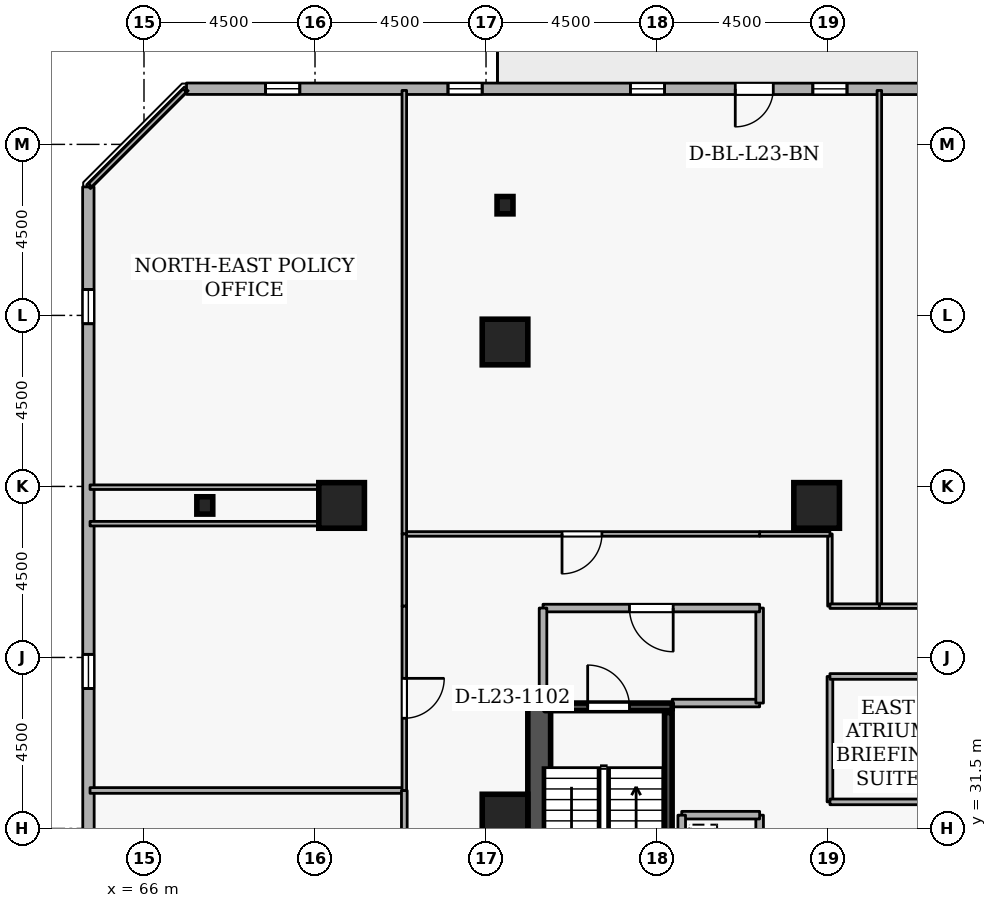
"""IFC4 building model, lengths in metres.
Left out: names, types, materials, properties, quantities, classifications, styles, units other than length and angle.
Written with IfcOpenShell. Run it as: python <this file> out.ifc"""

import sys

from ifc_helpers import new_model, si_unit, direction, frame, frame_2d, origin, origin_2d, place, context, subcontext, project, spatial, rectangle, i_section, extrude, element, fill, save


model = new_model("IFC4")
c1 = context("Model", 3, precision=1e-05, world=origin(), true_north=direction((0.0, 1.0)))
c2 = subcontext(c1, "Body", "Model", "MODEL_VIEW")
j1 = project(units=[si_unit("LENGTHUNIT", "METRE"), si_unit("PLANEANGLEUNIT", "RADIAN")], contexts=[c1])
p1 = place(None, origin())
s1 = spatial("IfcSite", under=j1, at=p1, CompositionType="ELEMENT")
p2 = place(p1, origin())
s2 = spatial("IfcBuilding", under=s1, at=p2, CompositionType="ELEMENT")
p3 = place(p2, frame((0.0, 0.0, 90.9)))
s3 = spatial("IfcBuildingStorey", under=s2, at=p3, CompositionType="ELEMENT", Elevation=90.9)
p4 = place(p3, frame((76.4, 19.2, 0.0), z_axis=(0.0, 0.0, 1.0), x_axis=(0.0, 1.0, 0.0)))
e1 = element("IfcWall", 1, at=p4, inside=s3, PredefinedType="SHEAR", context=c2, shape_type="SweptSolid", body=[
    extrude(rectangle(XDim=15.6, YDim=0.6, at=frame_2d((7.8, 0.0))), origin(), (0.0, 0.0, 1.0), 3.6),
])
for number, where, z_axis, x_axis in (
    (2, (75.5, 44.3, 0.0), (0.0, 0.0, 1.0), (1.0, 0.0, 0.0)),
    (3, (71.2, 40.0, 0.0), (0.0, 0.0, 1.0), (1.0, 0.0, 0.0)),
    (4, (83.7, 40.0, 0.0), (0.0, 0.0, 1.0), (1.0, 0.0, 0.0)),
    (5, (75.5, 31.8, 0.0), (0.0, 0.0, 1.0), (1.0, 0.0, 0.0)),
):
    element("IfcColumn", number, at=place(p3, frame(where, z_axis=z_axis, x_axis=x_axis)), inside=s3, PredefinedType="COLUMN", context=c2, shape_type="SweptSolid", body=[
        extrude(rectangle(XDim=1.2, YDim=1.2, at=origin_2d()), origin(), (0.0, 0.0, 1.0), 3.6),
    ])
for number, where, z_axis, x_axis in (
    (6, (75.5, 47.9, 0.0), (0.0, 0.0, 1.0), (1.0, 0.0, 0.0)),
    (7, (67.6, 40.0, 0.0), (0.0, 0.0, 1.0), (1.0, 0.0, 0.0)),
):
    element("IfcColumn", number, at=place(p3, frame(where, z_axis=z_axis, x_axis=x_axis)), inside=s3, PredefinedType="COLUMN", context=c2, shape_type="SweptSolid", body=[
        extrude(i_section(OverallWidth=0.418, OverallDepth=0.456, WebThickness=0.042, FlangeThickness=0.067, FilletRadius=0.015, at=origin_2d()), origin(), (0.0, 0.0, 1.0), 3.6),
    ])
p5 = place(p3, frame((101.599, 50.957, 0.0), z_axis=(0.0, 0.0, 1.0), x_axis=(-0.99999997744, 0.000212414941, 0.0)))
e8 = element("IfcWall", 8, at=p5, inside=s3, PredefinedType="STANDARD", context=c2, shape_type="SweptSolid", body=[
    extrude(rectangle(XDim=34.481, YDim=0.3, at=frame_2d((17.24, 0.0))), origin(), (0.0, 0.0, 1.0), 2.7),
])
p6 = place(p5, frame((19.04, 0.0, 0.0)))
e9 = element("IfcOpeningElement", 9, at=p6, cuts=e8, PredefinedType="OPENING", context=c2, shape_type="SweptSolid", body=[
    extrude(rectangle(XDim=1.0, YDim=2.08, at=frame_2d((0.5, 1.04))), frame((0.0, 0.16, 0.0), z_axis=(0.0, -1.0, 0.0), x_axis=(1.0, 0.0, 0.0)), (0.0, 0.0, 1.0), 0.32),
])
p7 = place(p5, frame((2.7, 0.0, 0.72)))
e10 = element("IfcOpeningElement", 10, at=p7, cuts=e8, PredefinedType="OPENING", context=c2, shape_type="SweptSolid", body=[
    extrude(rectangle(XDim=0.9, YDim=1.75, at=frame_2d((0.45, 0.875))), frame((0.0, 0.16, 0.0), z_axis=(0.0, -1.0, 0.0), x_axis=(1.0, 0.0, 0.0)), (0.0, 0.0, 1.0), 0.32),
])
p8 = place(p5, frame((7.5, 0.0, 0.72)))
e11 = element("IfcOpeningElement", 11, at=p8, cuts=e8, PredefinedType="OPENING", context=c2, shape_type="SweptSolid", body=[
    extrude(rectangle(XDim=0.9, YDim=1.75, at=frame_2d((0.45, 0.875))), frame((0.0, 0.16, 0.0), z_axis=(0.0, -1.0, 0.0), x_axis=(1.0, 0.0, 0.0)), (0.0, 0.0, 1.0), 0.32),
])
p9 = place(p5, frame((17.1, 0.0, 0.72)))
e12 = element("IfcOpeningElement", 12, at=p9, cuts=e8, PredefinedType="OPENING", context=c2, shape_type="SweptSolid", body=[
    extrude(rectangle(XDim=0.9, YDim=1.75, at=frame_2d((0.45, 0.875))), frame((0.0, 0.16, 0.0), z_axis=(0.0, -1.0, 0.0), x_axis=(1.0, 0.0, 0.0)), (0.0, 0.0, 1.0), 0.32),
])
p10 = place(p5, frame((21.9, 0.0, 0.72)))
e13 = element("IfcOpeningElement", 13, at=p10, cuts=e8, PredefinedType="OPENING", context=c2, shape_type="SweptSolid", body=[
    extrude(rectangle(XDim=0.9, YDim=1.75, at=frame_2d((0.45, 0.875))), frame((0.0, 0.16, 0.0), z_axis=(0.0, -1.0, 0.0), x_axis=(1.0, 0.0, 0.0)), (0.0, 0.0, 1.0), 0.32),
])
p11 = place(p5, frame((26.7, 0.0, 0.72)))
e14 = element("IfcOpeningElement", 14, at=p11, cuts=e8, PredefinedType="OPENING", context=c2, shape_type="SweptSolid", body=[
    extrude(rectangle(XDim=0.9, YDim=1.75, at=frame_2d((0.45, 0.875))), frame((0.0, 0.16, 0.0), z_axis=(0.0, -1.0, 0.0), x_axis=(1.0, 0.0, 0.0)), (0.0, 0.0, 1.0), 0.32),
])
p12 = place(p5, frame((31.5, 0.0, 0.72)))
e15 = element("IfcOpeningElement", 15, at=p12, cuts=e8, PredefinedType="OPENING", context=c2, shape_type="SweptSolid", body=[
    extrude(rectangle(XDim=0.9, YDim=1.75, at=frame_2d((0.45, 0.875))), frame((0.0, 0.16, 0.0), z_axis=(0.0, -1.0, 0.0), x_axis=(1.0, 0.0, 0.0)), (0.0, 0.0, 1.0), 0.32),
])
p13 = place(p3, frame((64.535, 48.381, 0.0), z_axis=(0.0, 0.0, 1.0), x_axis=(0.000212414941, -0.99999997744, 0.0)))
e16 = element("IfcWall", 16, at=p13, inside=s3, PredefinedType="STANDARD", context=c2, shape_type="SweptSolid", body=[
    extrude(rectangle(XDim=34.481, YDim=0.3, at=frame_2d((17.24, 0.0))), origin(), (0.0, 0.0, 1.0), 2.7),
])
p14 = place(p13, frame((2.7, 0.0, 0.72)))
e17 = element("IfcOpeningElement", 17, at=p14, cuts=e16, PredefinedType="OPENING", context=c2, shape_type="SweptSolid", body=[
    extrude(rectangle(XDim=0.9, YDim=1.75, at=frame_2d((0.45, 0.875))), frame((0.0, 0.16, 0.0), z_axis=(0.0, -1.0, 0.0), x_axis=(1.0, 0.0, 0.0)), (0.0, 0.0, 1.0), 0.32),
])
p15 = place(p13, frame((12.3, 0.0, 0.72)))
e18 = element("IfcOpeningElement", 18, at=p15, cuts=e16, PredefinedType="OPENING", context=c2, shape_type="SweptSolid", body=[
    extrude(rectangle(XDim=0.9, YDim=1.75, at=frame_2d((0.45, 0.875))), frame((0.0, 0.16, 0.0), z_axis=(0.0, -1.0, 0.0), x_axis=(1.0, 0.0, 0.0)), (0.0, 0.0, 1.0), 0.32),
])
p16 = place(p13, frame((17.1, 0.0, 0.72)))
e19 = element("IfcOpeningElement", 19, at=p16, cuts=e16, PredefinedType="OPENING", context=c2, shape_type="SweptSolid", body=[
    extrude(rectangle(XDim=0.9, YDim=1.75, at=frame_2d((0.45, 0.875))), frame((0.0, 0.16, 0.0), z_axis=(0.0, -1.0, 0.0), x_axis=(1.0, 0.0, 0.0)), (0.0, 0.0, 1.0), 0.32),
])
p17 = place(p13, frame((31.5, 0.0, 0.72)))
e20 = element("IfcOpeningElement", 20, at=p17, cuts=e16, PredefinedType="OPENING", context=c2, shape_type="SweptSolid", body=[
    extrude(rectangle(XDim=0.9, YDim=1.75, at=frame_2d((0.45, 0.875))), frame((0.0, 0.16, 0.0), z_axis=(0.0, -1.0, 0.0), x_axis=(1.0, 0.0, 0.0)), (0.0, 0.0, 1.0), 0.32),
])
p18 = place(p3, frame((76.55, 34.7, 0.0), z_axis=(0.0, 0.0, 1.0), x_axis=(1.0, 0.0, 0.0)))
e21 = element("IfcWall", 21, at=p18, inside=s3, PredefinedType="SHEAR", context=c2, shape_type="SweptSolid", body=[
    extrude(rectangle(XDim=3.35, YDim=0.2, at=frame_2d((1.675, 0.0))), origin(), (0.0, 0.0, 1.0), 3.6),
])
p19 = place(p18, frame((1.125, 0.0, 0.0)))
e22 = element("IfcOpeningElement", 22, at=p19, cuts=e21, PredefinedType="OPENING", context=c2, shape_type="SweptSolid", body=[
    extrude(rectangle(XDim=1.1, YDim=2.1, at=frame_2d((0.55, 1.05))), frame((0.0, 0.11, 0.0), z_axis=(0.0, -1.0, 0.0), x_axis=(1.0, 0.0, 0.0)), (0.0, 0.0, 1.0), 0.22),
])
p20 = place(p3, frame((79.797, 27.45, 0.0), z_axis=(0.0, 0.0, 1.0), x_axis=(0.0, 1.0, 0.0)))
e23 = element("IfcWall", 23, at=p20, inside=s3, PredefinedType="SHEAR", context=c2, shape_type="SweptSolid", body=[
    extrude(rectangle(XDim=7.1, YDim=0.2, at=frame_2d((3.55, 0.0))), origin(), (0.0, 0.0, 1.0), 3.6),
])
p21 = place(p3, frame((79.9, 34.8, 0.0), z_axis=(0.0, 0.0, 1.0), x_axis=(1.0, 0.0, 0.0)))
e24 = element("IfcWall", 24, at=p21, inside=s3, PredefinedType="STANDARD", context=c2, shape_type="SweptSolid", body=[
    extrude(rectangle(XDim=2.3, YDim=0.2, at=frame_2d((1.15, 0.0))), origin(), (0.0, 0.0, 1.0), 2.545),
])
p22 = place(p3, frame((82.2, 34.8, 0.0), z_axis=(0.0, 0.0, 1.0), x_axis=(0.0, 1.0, 0.0)))
e25 = element("IfcWall", 25, at=p22, inside=s3, PredefinedType="STANDARD", context=c2, shape_type="SweptSolid", body=[
    extrude(rectangle(XDim=2.5, YDim=0.2, at=frame_2d((1.25, 0.0))), origin(), (0.0, 0.0, 1.0), 3.34),
])
p23 = place(p3, frame((82.2, 37.3, 0.0), z_axis=(0.0, 0.0, 1.0), x_axis=(-1.0, 0.0, 0.0)))
e26 = element("IfcWall", 26, at=p23, inside=s3, PredefinedType="STANDARD", context=c2, shape_type="SweptSolid", body=[
    extrude(rectangle(XDim=5.7, YDim=0.2, at=frame_2d((2.85, 0.0))), origin(), (0.0, 0.0, 1.0), 3.34),
])
p24 = place(p23, frame((2.275, 0.0, 0.0)))
e27 = element("IfcOpeningElement", 27, at=p24, cuts=e26, PredefinedType="OPENING", context=c2, shape_type="SweptSolid", body=[
    extrude(rectangle(XDim=1.15, YDim=2.1, at=frame_2d((0.575, 1.05))), frame((0.0, 0.11, 0.0), z_axis=(0.0, -1.0, 0.0), x_axis=(1.0, 0.0, 0.0)), (0.0, 0.0, 1.0), 0.22),
])
p25 = place(p3, frame((76.5, 37.3, 0.0), z_axis=(0.0, 0.0, 1.0), x_axis=(0.0, -1.0, 0.0)))
e28 = element("IfcWall", 28, at=p25, inside=s3, PredefinedType="STANDARD", context=c2, shape_type="SweptSolid", body=[
    extrude(rectangle(XDim=2.5, YDim=0.2, at=frame_2d((1.25, 0.0))), origin(), (0.0, 0.0, 1.0), 3.34),
])
p26 = place(p3, frame((82.2, 30.05, 0.0), z_axis=(0.0, 0.0, 1.0), x_axis=(0.0, 1.0, 0.0)))
e29 = element("IfcWall", 29, at=p26, inside=s3, PredefinedType="STANDARD", context=c2, shape_type="SweptSolid", body=[
    extrude(rectangle(XDim=1.8, YDim=0.2, at=frame_2d((0.9, 0.0))), origin(), (0.0, 0.0, 1.0), 3.34),
])
p27 = place(p26, frame((0.46, 0.0, 0.0)))
e30 = element("IfcOpeningElement", 30, at=p27, cuts=e29, PredefinedType="OPENING", context=c2, shape_type="SweptSolid", body=[
    extrude(rectangle(XDim=0.88, YDim=2.04, at=frame_2d((0.44, 1.02))), frame((0.0, 0.11, 0.0), z_axis=(0.0, -1.0, 0.0), x_axis=(1.0, 0.0, 0.0)), (0.0, 0.0, 1.0), 0.22),
])
p28 = place(p3, frame((82.2, 31.85, 0.0), z_axis=(0.0, 0.0, 1.0), x_axis=(-1.0, 0.0, 0.0)))
e31 = element("IfcWall", 31, at=p28, inside=s3, PredefinedType="STANDARD", context=c2, shape_type="SweptSolid", body=[
    extrude(rectangle(XDim=2.05, YDim=0.2, at=frame_2d((1.025, 0.0))), origin(), (0.0, 0.0, 1.0), 3.34),
])
p29 = place(p3, frame((80.15, 31.85, 0.0), z_axis=(0.0, 0.0, 1.0), x_axis=(0.0, -1.0, 0.0)))
e32 = element("IfcWall", 32, at=p29, inside=s3, PredefinedType="STANDARD", context=c2, shape_type="SweptSolid", body=[
    extrude(rectangle(XDim=1.8, YDim=0.2, at=frame_2d((0.9, 0.0))), origin(), (0.0, 0.0, 1.0), 3.34),
])
p30 = place(p3, frame((85.35, 37.35, 0.0), z_axis=(0.0, 0.0, 1.0), x_axis=(0.0, 1.0, 0.0)))
e33 = element("IfcWall", 33, at=p30, inside=s3, PredefinedType="PARTITIONING", context=c2, shape_type="SweptSolid", body=[
    extrude(rectangle(XDim=13.57, YDim=0.12, at=frame_2d((6.785, 0.0))), origin(), (0.0, 0.0, 1.0), 3.34),
])
p31 = place(p3, frame((88.5, 37.35, 0.0), z_axis=(0.0, 0.0, 1.0), x_axis=(-1.0, 0.0, 0.0)))
e34 = element("IfcWall", 34, at=p31, inside=s3, PredefinedType="PARTITIONING", context=c2, shape_type="SweptSolid", body=[
    extrude(rectangle(XDim=3.15, YDim=0.12, at=frame_2d((1.575, 0.0))), origin(), (0.0, 0.0, 1.0), 3.34),
])
p32 = place(p31, frame((1.1, 0.0, 0.0)))
e35 = element("IfcOpeningElement", 35, at=p32, cuts=e34, PredefinedType="OPENING", context=c2, shape_type="SweptSolid", body=[
    extrude(rectangle(XDim=0.95, YDim=2.1, at=frame_2d((0.475, 1.05))), frame((0.0, 0.07, 0.0), z_axis=(0.0, -1.0, 0.0), x_axis=(1.0, 0.0, 0.0)), (0.0, 0.0, 1.0), 0.14),
])
p33 = place(p3, frame((84.05, 37.35, 0.0), z_axis=(0.0, 0.0, 1.0), x_axis=(0.0, 1.0, 0.0)))
e36 = element("IfcWall", 36, at=p33, inside=s3, PredefinedType="PARTITIONING", context=c2, shape_type="SweptSolid", body=[
    extrude(rectangle(XDim=1.9, YDim=0.12, at=frame_2d((0.95, 0.0))), origin(), (0.0, 0.0, 1.0), 3.34),
])
p34 = place(p3, frame((84.05, 39.25, 0.0), z_axis=(0.0, 0.0, 1.0), x_axis=(-1.0, 0.0, 0.0)))
e37 = element("IfcWall", 37, at=p34, inside=s3, PredefinedType="PARTITIONING", context=c2, shape_type="SweptSolid", body=[
    extrude(rectangle(XDim=1.85, YDim=0.12, at=frame_2d((0.925, 0.0))), origin(), (0.0, 0.0, 1.0), 3.34),
])
p35 = place(p3, frame((82.2, 39.25, 0.0), z_axis=(0.0, 0.0, 1.0), x_axis=(-1.0, 0.0, 0.0)))
e38 = element("IfcWall", 38, at=p35, inside=s3, PredefinedType="PARTITIONING", context=c2, shape_type="SweptSolid", body=[
    extrude(rectangle(XDim=9.35, YDim=0.12, at=frame_2d((4.675, 0.0))), origin(), (0.0, 0.0, 1.0), 3.34),
])
p36 = place(p35, frame((4.15, 0.0, 0.0)))
e39 = element("IfcOpeningElement", 39, at=p36, cuts=e38, PredefinedType="OPENING", context=c2, shape_type="SweptSolid", body=[
    extrude(rectangle(XDim=1.05, YDim=2.1, at=frame_2d((0.525, 1.05))), frame((0.0, 0.07, 0.0), z_axis=(0.0, -1.0, 0.0), x_axis=(1.0, 0.0, 0.0)), (0.0, 0.0, 1.0), 0.14),
])
p37 = place(p3, frame((72.85, 39.25, 0.0), z_axis=(0.0, 0.0, 1.0), x_axis=(0.0, 1.0, 0.0)))
e40 = element("IfcWall", 40, at=p37, inside=s3, PredefinedType="PARTITIONING", context=c2, shape_type="SweptSolid", body=[
    extrude(rectangle(XDim=11.67, YDim=0.12, at=frame_2d((5.835, 0.0))), origin(), (0.0, 0.0, 1.0), 3.34),
])
p38 = place(p3, frame((85.35, 37.35, 0.0), z_axis=(0.0, 0.0, 1.0), x_axis=(-1.0, 0.0, 0.0)))
e41 = element("IfcWall", 41, at=p38, inside=s3, PredefinedType="PARTITIONING", context=c2, shape_type="SweptSolid", body=[
    extrude(rectangle(XDim=1.3, YDim=0.12, at=frame_2d((0.65, 0.0))), origin(), (0.0, 0.0, 1.0), 3.34),
])
p39 = place(p3, frame((84.05, 32.2, 0.0), z_axis=(0.0, 0.0, 1.0), x_axis=(0.0, 1.0, 0.0)))
e42 = element("IfcWall", 42, at=p39, inside=s3, PredefinedType="PARTITIONING", context=c2, shape_type="SweptSolid", body=[
    extrude(rectangle(XDim=3.3, YDim=0.15, at=frame_2d((1.65, 0.0))), origin(), (0.0, 0.0, 1.0), 3.34),
])
p40 = place(p3, frame((84.05, 35.5, 0.0), z_axis=(0.0, 0.0, 1.0), x_axis=(1.0, 0.0, 0.0)))
e43 = element("IfcWall", 43, at=p40, inside=s3, PredefinedType="PARTITIONING", context=c2, shape_type="SweptSolid", body=[
    extrude(rectangle(XDim=8.9, YDim=0.15, at=frame_2d((4.45, 0.0))), origin(), (0.0, 0.0, 1.0), 3.34),
])
p41 = place(p40, frame((3.8, 0.0, 0.0)))
e44 = element("IfcOpeningElement", 44, at=p41, cuts=e43, PredefinedType="OPENING", context=c2, shape_type="SweptSolid", body=[
    extrude(rectangle(XDim=1.3, YDim=2.12, at=frame_2d((0.65, 1.06))), frame((0.0, 0.085, 0.0), z_axis=(0.0, -1.0, 0.0), x_axis=(1.0, 0.0, 0.0)), (0.0, 0.0, 1.0), 0.17),
])
p42 = place(p3, frame((92.95, 32.2, 0.0), z_axis=(0.0, 0.0, 1.0), x_axis=(-1.0, 0.0, 0.0)))
e45 = element("IfcWall", 45, at=p42, inside=s3, PredefinedType="PARTITIONING", context=c2, shape_type="SweptSolid", body=[
    extrude(rectangle(XDim=8.9, YDim=0.15, at=frame_2d((4.45, 0.0))), origin(), (0.0, 0.0, 1.0), 3.34),
])
p43 = place(p3, frame((64.58, 32.5, 0.0), z_axis=(0.0, 0.0, 1.0), x_axis=(1.0, 0.0, 0.0)))
e46 = element("IfcWall", 46, at=p43, inside=s3, PredefinedType="PARTITIONING", context=c2, shape_type="SweptSolid", body=[
    extrude(rectangle(XDim=8.27, YDim=0.15, at=frame_2d((4.135, 0.0))), origin(), (0.0, 0.0, 1.0), 3.34),
])
p44 = place(p3, frame((72.85, 32.5, 0.0), z_axis=(0.0, 0.0, 1.0), x_axis=(0.0, -1.0, 0.0)))
e47 = element("IfcWall", 47, at=p44, inside=s3, PredefinedType="PARTITIONING", context=c2, shape_type="SweptSolid", body=[
    extrude(rectangle(XDim=11.0, YDim=0.15, at=frame_2d((5.5, 0.0))), origin(), (0.0, 0.0, 1.0), 3.34),
])
p45 = place(p44, frame((3.31, 0.0, 0.0)))
e48 = element("IfcOpeningElement", 48, at=p45, cuts=e47, PredefinedType="OPENING", context=c2, shape_type="SweptSolid", body=[
    extrude(rectangle(XDim=1.3, YDim=2.12, at=frame_2d((0.65, 1.06))), frame((0.0, 0.085, 0.0), z_axis=(0.0, -1.0, 0.0), x_axis=(1.0, 0.0, 0.0)), (0.0, 0.0, 1.0), 0.17),
])
for number, where, z_axis, x_axis in (
    (49, (64.58, 39.52, 0.0), (0.0, 0.0, 1.0), (1.0, 0.0, 0.0)),
    (50, (71.2, 40.48, 0.0), (0.0, 0.0, 1.0), (-1.0, 0.0, 0.0)),
):
    element("IfcWall", number, at=place(p3, frame(where, z_axis=z_axis, x_axis=x_axis)), inside=s3, PredefinedType="PARTITIONING", context=c2, shape_type="SweptSolid", body=[
        extrude(rectangle(XDim=6.62, YDim=0.12, at=frame_2d((3.31, 0.0))), origin(), (0.0, 0.0, 1.0), 3.34),
    ])
p46 = place(p3, frame((64.58, 48.425, 0.0), z_axis=(0.0, 0.0, 1.0), x_axis=(0.707106781187, 0.707106781187, 0.0)))
e51 = element("IfcWall", 51, at=p46, inside=s3, PredefinedType="PARTITIONING", context=c2, shape_type="SweptSolid", body=[
    extrude(rectangle(XDim=3.528, YDim=0.12, at=frame_2d((1.764, 0.0))), origin(), (0.0, 0.0, 1.0), 3.34),
])
p47 = place(p3, frame((72.85, 39.25, 0.0), z_axis=(0.0, 0.0, 1.0), x_axis=(0.0, -1.0, 0.0)))
e52 = element("IfcWall", 52, at=p47, inside=s3, PredefinedType="PARTITIONING", context=c2, shape_type="SweptSolid", body=[
    extrude(rectangle(XDim=1.9, YDim=0.12, at=frame_2d((0.95, 0.0))), origin(), (0.0, 0.0, 1.0), 2.895),
])
p48 = place(p3, frame((72.85, 37.35, 0.0), z_axis=(0.0, 0.0, 1.0), x_axis=(0.0, -1.0, 0.0)))
e53 = element("IfcWall", 53, at=p48, inside=s3, PredefinedType="PARTITIONING", context=c2, shape_type="SweptSolid", body=[
    extrude(rectangle(XDim=4.85, YDim=0.12, at=frame_2d((2.425, 0.0))), origin(), (0.0, 0.0, 1.0), 2.895),
])
p49 = place(p48, frame((1.9, 0.0, 0.0)))
e54 = element("IfcOpeningElement", 54, at=p49, cuts=e53, PredefinedType="OPENING", context=c2, shape_type="SweptSolid", body=[
    extrude(rectangle(XDim=1.05, YDim=2.1, at=frame_2d((0.525, 1.05))), frame((0.0, 0.07, 0.0), z_axis=(0.0, -1.0, 0.0), x_axis=(1.0, 0.0, 0.0)), (0.0, 0.0, 1.0), 0.14),
])
p50 = place(p6, origin())
e55 = element("IfcDoor", 55, at=p50, inside=s3, OperationType="SINGLE_SWING_RIGHT", PredefinedType="DOOR", context=c2, shape_type="SweptSolid", body=[
    extrude(rectangle(XDim=1.0, YDim=2.08, at=frame_2d((0.5, 1.04))), frame((0.0, 0.025, 0.0), z_axis=(0.0, -1.0, 0.0), x_axis=(1.0, 0.0, 0.0)), (0.0, 0.0, 1.0), 0.05),
])
fill(e9, e55)
p51 = place(p9, origin())
e56 = element("IfcWindow", 56, at=p51, inside=s3, PartitioningType="SINGLE_PANEL", PredefinedType="WINDOW", context=c2, shape_type="SweptSolid", body=[
    extrude(rectangle(XDim=0.9, YDim=1.75, at=frame_2d((0.45, 0.875))), frame((0.0, 0.03, 0.0), z_axis=(0.0, -1.0, 0.0), x_axis=(1.0, 0.0, 0.0)), (0.0, 0.0, 1.0), 0.06),
])
fill(e12, e56)
p52 = place(p10, origin())
e57 = element("IfcWindow", 57, at=p52, inside=s3, PartitioningType="SINGLE_PANEL", PredefinedType="WINDOW", context=c2, shape_type="SweptSolid", body=[
    extrude(rectangle(XDim=0.9, YDim=1.75, at=frame_2d((0.45, 0.875))), frame((0.0, 0.03, 0.0), z_axis=(0.0, -1.0, 0.0), x_axis=(1.0, 0.0, 0.0)), (0.0, 0.0, 1.0), 0.06),
])
fill(e13, e57)
p53 = place(p11, origin())
e58 = element("IfcWindow", 58, at=p53, inside=s3, PartitioningType="SINGLE_PANEL", PredefinedType="WINDOW", context=c2, shape_type="SweptSolid", body=[
    extrude(rectangle(XDim=0.9, YDim=1.75, at=frame_2d((0.45, 0.875))), frame((0.0, 0.03, 0.0), z_axis=(0.0, -1.0, 0.0), x_axis=(1.0, 0.0, 0.0)), (0.0, 0.0, 1.0), 0.06),
])
fill(e14, e58)
p54 = place(p12, origin())
e59 = element("IfcWindow", 59, at=p54, inside=s3, PartitioningType="SINGLE_PANEL", PredefinedType="WINDOW", context=c2, shape_type="SweptSolid", body=[
    extrude(rectangle(XDim=0.9, YDim=1.75, at=frame_2d((0.45, 0.875))), frame((0.0, 0.03, 0.0), z_axis=(0.0, -1.0, 0.0), x_axis=(1.0, 0.0, 0.0)), (0.0, 0.0, 1.0), 0.06),
])
fill(e15, e59)
p55 = place(p14, origin())
e60 = element("IfcWindow", 60, at=p55, inside=s3, PartitioningType="SINGLE_PANEL", PredefinedType="WINDOW", context=c2, shape_type="SweptSolid", body=[
    extrude(rectangle(XDim=0.9, YDim=1.75, at=frame_2d((0.45, 0.875))), frame((0.0, 0.03, 0.0), z_axis=(0.0, -1.0, 0.0), x_axis=(1.0, 0.0, 0.0)), (0.0, 0.0, 1.0), 0.06),
])
fill(e17, e60)
p56 = place(p15, origin())
e61 = element("IfcWindow", 61, at=p56, inside=s3, PartitioningType="SINGLE_PANEL", PredefinedType="WINDOW", context=c2, shape_type="SweptSolid", body=[
    extrude(rectangle(XDim=0.9, YDim=1.75, at=frame_2d((0.45, 0.875))), frame((0.0, 0.03, 0.0), z_axis=(0.0, -1.0, 0.0), x_axis=(1.0, 0.0, 0.0)), (0.0, 0.0, 1.0), 0.06),
])
fill(e18, e61)
p57 = place(p19, origin())
e62 = element("IfcDoor", 62, at=p57, inside=s3, OperationType="SINGLE_SWING_LEFT", PredefinedType="DOOR", context=c2, shape_type="SweptSolid", body=[
    extrude(rectangle(XDim=1.1, YDim=2.1, at=frame_2d((0.55, 1.05))), frame((0.0, 0.025, 0.0), z_axis=(0.0, -1.0, 0.0), x_axis=(1.0, 0.0, 0.0)), (0.0, 0.0, 1.0), 0.05),
])
fill(e22, e62)
p58 = place(p24, origin())
e63 = element("IfcDoor", 63, at=p58, inside=s3, OperationType="SINGLE_SWING_LEFT", PredefinedType="DOOR", context=c2, shape_type="SweptSolid", body=[
    extrude(rectangle(XDim=1.15, YDim=2.1, at=frame_2d((0.575, 1.05))), frame((0.0, 0.025, 0.0), z_axis=(0.0, -1.0, 0.0), x_axis=(1.0, 0.0, 0.0)), (0.0, 0.0, 1.0), 0.05),
])
fill(e27, e63)
p59 = place(p36, origin())
e64 = element("IfcDoor", 64, at=p59, inside=s3, OperationType="SINGLE_SWING_RIGHT", PredefinedType="DOOR", context=c2, shape_type="SweptSolid", body=[
    extrude(rectangle(XDim=1.05, YDim=2.1, at=frame_2d((0.525, 1.05))), frame((0.0, 0.025, 0.0), z_axis=(0.0, -1.0, 0.0), x_axis=(1.0, 0.0, 0.0)), (0.0, 0.0, 1.0), 0.05),
])
fill(e39, e64)
p60 = place(p49, origin())
e65 = element("IfcDoor", 65, at=p60, inside=s3, OperationType="SINGLE_SWING_LEFT", PredefinedType="DOOR", context=c2, shape_type="SweptSolid", body=[
    extrude(rectangle(XDim=1.05, YDim=2.1, at=frame_2d((0.525, 1.05))), frame((0.0, 0.025, 0.0), z_axis=(0.0, -1.0, 0.0), x_axis=(1.0, 0.0, 0.0)), (0.0, 0.0, 1.0), 0.05),
])
fill(e54, e65)
save(model, sys.argv[1])
